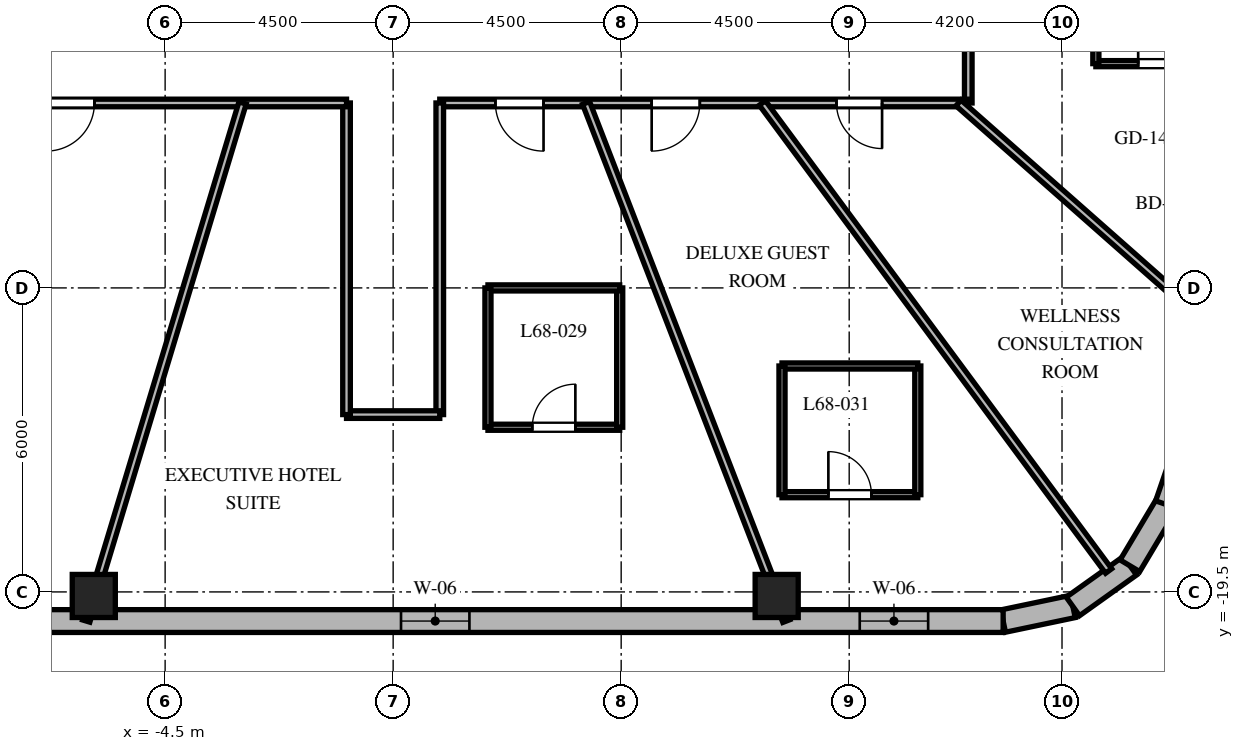
"""IFC4 building model, lengths in metres.
Left out: names, types, materials, properties, quantities, classifications, styles, units other than length and angle.
Written with IfcOpenShell. Run it as: python <this file> out.ifc"""

import sys

from ifc_helpers import new_model, si_unit, direction, frame, frame_2d, origin, origin_2d, place, context, subcontext, project, spatial, rectangle, extrude, element, fill, save


model = new_model("IFC4")
c1 = context("Model", 3, precision=1e-05, world=origin(), true_north=direction((0.0, 1.0)))
c2 = subcontext(c1, "Body", "Model", "MODEL_VIEW")
j1 = project(units=[si_unit("LENGTHUNIT", "METRE"), si_unit("PLANEANGLEUNIT", "RADIAN")], contexts=[c1])
p1 = place(None, origin())
s1 = spatial("IfcSite", under=j1, at=p1, CompositionType="ELEMENT")
p2 = place(p1, origin())
s2 = spatial("IfcBuilding", under=s1, at=p2, CompositionType="ELEMENT")
p3 = place(p2, frame((0.0, 0.0, 273.0)))
s3 = spatial("IfcBuildingStorey", under=s2, at=p3, CompositionType="ELEMENT", Elevation=273.0)
for number, where, z_axis, x_axis in (
    (1, (-5.908, -19.58, 0.0), (0.0, 0.0, 1.0), (1.0, 0.0, 0.0)),
    (2, (7.569, -19.58, 0.0), (0.0, 0.0, 1.0), (1.0, 0.0, 0.0)),
):
    element("IfcColumn", number, at=place(p3, frame(where, z_axis=z_axis, x_axis=x_axis)), inside=s3, PredefinedType="COLUMN", context=c2, shape_type="SweptSolid", body=[
        extrude(rectangle(XDim=0.85, YDim=0.85, at=origin_2d()), origin(), (0.0, 0.0, 1.0), 3.9),
    ])
p4 = place(p3, frame((12.038, -20.075, 0.0), z_axis=(0.0, 0.0, 1.0), x_axis=(0.978750122553, 0.205056571711, 0.0)))
e3 = element("IfcWall", 3, at=p4, inside=s3, PredefinedType="SOLIDWALL", context=c2, shape_type="SweptSolid", body=[
    extrude(rectangle(XDim=1.406, YDim=0.45, at=frame_2d((0.703, 0.0))), origin(), (0.0, 0.0, 1.0), 3.6),
])
p5 = place(p3, frame((13.415, -19.787, 0.0), z_axis=(0.0, 0.0, 1.0), x_axis=(0.814055493997, 0.580787097561, 0.0)))
e4 = element("IfcWall", 4, at=p5, inside=s3, PredefinedType="SOLIDWALL", context=c2, shape_type="SweptSolid", body=[
    extrude(rectangle(XDim=1.383, YDim=0.45, at=frame_2d((0.691, 0.0))), origin(), (0.0, 0.0, 1.0), 3.6),
])
p6 = place(p3, frame((14.54, -18.984, 0.0), z_axis=(0.0, 0.0, 1.0), x_axis=(0.512374906623, 0.858761873317, 0.0)))
e5 = element("IfcWall", 5, at=p6, inside=s3, PredefinedType="SOLIDWALL", context=c2, shape_type="SweptSolid", body=[
    extrude(rectangle(XDim=1.406, YDim=0.45, at=frame_2d((0.703, 0.0))), origin(), (0.0, 0.0, 1.0), 3.6),
])
p7 = place(p3, frame((-10.379, -20.075, 0.0), z_axis=(0.0, 0.0, 1.0), x_axis=(1.0, 0.0, 0.0)))
e6 = element("IfcWall", 6, at=p7, inside=s3, PredefinedType="SOLIDWALL", context=c2, shape_type="SweptSolid", body=[
    extrude(rectangle(XDim=22.417, YDim=0.45, at=frame_2d((11.208, 0.0))), origin(), (0.0, 0.0, 1.0), 3.6),
])
p8 = place(p7, frame((1.48, 0.0, 0.8)))
e7 = element("IfcOpeningElement", 7, at=p8, cuts=e6, PredefinedType="OPENING", context=c2, shape_type="SweptSolid", body=[
    extrude(rectangle(XDim=1.35, YDim=1.75, at=frame_2d((0.675, 0.875))), frame((0.0, 0.235, 0.0), z_axis=(0.0, -1.0, 0.0), x_axis=(1.0, 0.0, 0.0)), (0.0, 0.0, 1.0), 0.47),
])
p9 = place(p7, frame((10.534, 0.0, 0.8)))
e8 = element("IfcOpeningElement", 8, at=p9, cuts=e6, PredefinedType="OPENING", context=c2, shape_type="SweptSolid", body=[
    extrude(rectangle(XDim=1.35, YDim=1.75, at=frame_2d((0.675, 0.875))), frame((0.0, 0.235, 0.0), z_axis=(0.0, -1.0, 0.0), x_axis=(1.0, 0.0, 0.0)), (0.0, 0.0, 1.0), 0.47),
])
p10 = place(p7, frame((19.587, 0.0, 0.8)))
e9 = element("IfcOpeningElement", 9, at=p10, cuts=e6, PredefinedType="OPENING", context=c2, shape_type="SweptSolid", body=[
    extrude(rectangle(XDim=1.35, YDim=1.75, at=frame_2d((0.675, 0.875))), frame((0.0, 0.235, 0.0), z_axis=(0.0, -1.0, 0.0), x_axis=(1.0, 0.0, 0.0)), (0.0, 0.0, 1.0), 0.47),
])
p11 = place(p3, frame((15.26, -17.776, 0.0), z_axis=(0.0, 0.0, 1.0), x_axis=(0.325407437101, 0.945573899745, 0.0)))
e10 = element("IfcWall", 10, at=p11, inside=s3, PredefinedType="SOLIDWALL", context=c2, shape_type="SweptSolid", body=[
    extrude(rectangle(XDim=18.552, YDim=0.45, at=frame_2d((9.276, 0.0))), origin(), (0.0, 0.0, 1.0), 3.6),
])
p12 = place(p11, frame((4.602, 0.0, 0.0)))
e11 = element("IfcOpeningElement", 11, at=p12, cuts=e10, PredefinedType="OPENING", context=c2, shape_type="SweptSolid", body=[
    extrude(rectangle(XDim=0.95, YDim=2.15, at=frame_2d((0.475, 1.075))), frame((0.0, 0.235, 0.0), z_axis=(0.0, -1.0, 0.0), x_axis=(1.0, 0.0, 0.0)), (0.0, 0.0, 1.0), 0.47),
])
p13 = place(p11, frame((1.161, 0.0, 0.8)))
e12 = element("IfcOpeningElement", 12, at=p13, cuts=e10, PredefinedType="OPENING", context=c2, shape_type="SweptSolid", body=[
    extrude(rectangle(XDim=1.35, YDim=1.75, at=frame_2d((0.675, 0.875))), frame((0.0, 0.235, 0.0), z_axis=(0.0, -1.0, 0.0), x_axis=(1.0, 0.0, 0.0)), (0.0, 0.0, 1.0), 0.47),
])
p14 = place(p11, frame((8.548, 0.0, 0.8)))
e13 = element("IfcOpeningElement", 13, at=p14, cuts=e10, PredefinedType="OPENING", context=c2, shape_type="SweptSolid", body=[
    extrude(rectangle(XDim=1.35, YDim=1.75, at=frame_2d((0.675, 0.875))), frame((0.0, 0.235, 0.0), z_axis=(0.0, -1.0, 0.0), x_axis=(1.0, 0.0, 0.0)), (0.0, 0.0, 1.0), 0.47),
])
p15 = place(p11, frame((15.987, 0.0, 0.8)))
e14 = element("IfcOpeningElement", 14, at=p15, cuts=e10, PredefinedType="OPENING", context=c2, shape_type="SweptSolid", body=[
    extrude(rectangle(XDim=1.35, YDim=1.75, at=frame_2d((0.675, 0.875))), frame((0.0, 0.235, 0.0), z_axis=(0.0, -1.0, 0.0), x_axis=(1.0, 0.0, 0.0)), (0.0, 0.0, 1.0), 0.47),
])
p16 = place(p3, frame((11.35, -4.4, 0.0), z_axis=(0.0, 0.0, 1.0), x_axis=(0.0, -1.0, 0.0)))
e15 = element("IfcWall", 15, at=p16, inside=s3, PredefinedType="PARTITIONING", context=c2, shape_type="SweptSolid", body=[
    extrude(rectangle(XDim=5.45, YDim=0.15, at=frame_2d((2.725, 0.0))), origin(), (0.0, 0.0, 1.0), 3.09),
])
p17 = place(p3, frame((11.35, -9.85, 0.0), z_axis=(0.0, 0.0, 1.0), x_axis=(-1.0, 0.0, 0.0)))
e16 = element("IfcWall", 16, at=p17, inside=s3, PredefinedType="PARTITIONING", context=c2, shape_type="SweptSolid", body=[
    extrude(rectangle(XDim=10.43, YDim=0.15, at=frame_2d((5.215, 0.0))), origin(), (0.0, 0.0, 1.0), 3.09),
])
p18 = place(p17, frame((8.382, 0.0, 0.0)))
e17 = element("IfcOpeningElement", 17, at=p18, cuts=e16, PredefinedType="OPENING", context=c2, shape_type="SweptSolid", body=[
    extrude(rectangle(XDim=0.95, YDim=2.03, at=frame_2d((0.475, 1.015))), frame((0.0, 0.085, 0.0), z_axis=(0.0, -1.0, 0.0), x_axis=(1.0, 0.0, 0.0)), (0.0, 0.0, 1.0), 0.17),
])
p19 = place(p17, frame((5.298, 0.0, 0.0)))
e18 = element("IfcOpeningElement", 18, at=p19, cuts=e16, PredefinedType="OPENING", context=c2, shape_type="SweptSolid", body=[
    extrude(rectangle(XDim=0.95, YDim=2.03, at=frame_2d((0.475, 1.015))), frame((0.0, 0.085, 0.0), z_axis=(0.0, -1.0, 0.0), x_axis=(1.0, 0.0, 0.0)), (0.0, 0.0, 1.0), 0.17),
])
p20 = place(p17, frame((1.701, 0.0, 0.0)))
e19 = element("IfcOpeningElement", 19, at=p20, cuts=e16, PredefinedType="OPENING", context=c2, shape_type="SweptSolid", body=[
    extrude(rectangle(XDim=0.9, YDim=2.03, at=frame_2d((0.45, 1.015))), frame((0.0, 0.085, 0.0), z_axis=(0.0, -1.0, 0.0), x_axis=(1.0, 0.0, 0.0)), (0.0, 0.0, 1.0), 0.17),
])
p21 = place(p3, frame((0.92, -9.85, 0.0), z_axis=(0.0, 0.0, 1.0), x_axis=(0.0, -1.0, 0.0)))
e20 = element("IfcWall", 20, at=p21, inside=s3, PredefinedType="PARTITIONING", context=c2, shape_type="SweptSolid", body=[
    extrude(rectangle(XDim=6.15, YDim=0.15, at=frame_2d((3.075, 0.0))), origin(), (0.0, 0.0, 1.0), 3.041),
])
p22 = place(p3, frame((0.92, -16.0, 0.0), z_axis=(0.0, 0.0, 1.0), x_axis=(-1.0, 0.0, 0.0)))
e21 = element("IfcWall", 21, at=p22, inside=s3, PredefinedType="PARTITIONING", context=c2, shape_type="SweptSolid", body=[
    extrude(rectangle(XDim=1.84, YDim=0.15, at=frame_2d((0.92, 0.0))), origin(), (0.0, 0.0, 1.0), 3.6),
])
p23 = place(p3, frame((-0.92, -16.0, 0.0), z_axis=(0.0, 0.0, 1.0), x_axis=(0.0, 1.0, 0.0)))
e22 = element("IfcWall", 22, at=p23, inside=s3, PredefinedType="PARTITIONING", context=c2, shape_type="SweptSolid", body=[
    extrude(rectangle(XDim=6.15, YDim=0.15, at=frame_2d((3.075, 0.0))), origin(), (0.0, 0.0, 1.0), 3.041),
])
p24 = place(p3, frame((-0.92, -9.85, 0.0), z_axis=(0.0, 0.0, 1.0), x_axis=(-1.0, 0.0, 0.0)))
e23 = element("IfcWall", 23, at=p24, inside=s3, PredefinedType="PARTITIONING", context=c2, shape_type="SweptSolid", body=[
    extrude(rectangle(XDim=10.43, YDim=0.15, at=frame_2d((5.215, 0.0))), origin(), (0.0, 0.0, 1.0), 3.09),
])
p25 = place(p24, frame((4.975, 0.0, 0.0)))
e24 = element("IfcOpeningElement", 24, at=p25, cuts=e23, PredefinedType="OPENING", context=c2, shape_type="SweptSolid", body=[
    extrude(rectangle(XDim=0.95, YDim=2.03, at=frame_2d((0.475, 1.015))), frame((0.0, 0.085, 0.0), z_axis=(0.0, -1.0, 0.0), x_axis=(1.0, 0.0, 0.0)), (0.0, 0.0, 1.0), 0.17),
])
p26 = place(p3, frame((-2.972, -9.85, 0.0), z_axis=(0.0, 0.0, 1.0), x_axis=(-0.288872169679, -0.957367677324, 0.0)))
e25 = element("IfcWall", 25, at=p26, inside=s3, PredefinedType="PARTITIONING", context=c2, shape_type="SweptSolid", body=[
    extrude(rectangle(XDim=10.68, YDim=0.15, at=frame_2d((5.34, 0.0))), origin(), (0.0, 0.0, 1.0), 2.94),
])
p27 = place(p3, frame((3.808, -9.85, 0.0), z_axis=(0.0, 0.0, 1.0), x_axis=(0.360587327934, -0.932725457427, 0.0)))
e26 = element("IfcWall", 26, at=p27, inside=s3, PredefinedType="PARTITIONING", context=c2, shape_type="SweptSolid", body=[
    extrude(rectangle(XDim=10.962, YDim=0.15, at=frame_2d((5.481, 0.0))), origin(), (0.0, 0.0, 1.0), 2.94),
])
p28 = place(p3, frame((7.287, -9.85, 0.0), z_axis=(0.0, 0.0, 1.0), x_axis=(0.594730961824, -0.803924799373, 0.0)))
e27 = element("IfcWall", 27, at=p28, inside=s3, PredefinedType="PARTITIONING", context=c2, shape_type="SweptSolid", body=[
    extrude(rectangle(XDim=11.49, YDim=0.15, at=frame_2d((5.745, 0.0))), origin(), (0.0, 0.0, 1.0), 2.94),
])
p29 = place(p3, frame((11.157, -9.85, 0.0), z_axis=(0.0, 0.0, 1.0), x_axis=(0.74966962095, -0.661812253909, 0.0)))
e28 = element("IfcWall", 28, at=p29, inside=s3, PredefinedType="PARTITIONING", context=c2, shape_type="SweptSolid", body=[
    extrude(rectangle(XDim=6.989, YDim=0.15, at=frame_2d((3.494, 0.0))), origin(), (0.0, 0.0, 1.0), 2.94),
])
p30 = place(p3, frame((1.871, -16.25, 0.0), z_axis=(0.0, 0.0, 1.0), x_axis=(1.0, 0.0, 0.0)))
e29 = element("IfcWall", 29, at=p30, inside=s3, PredefinedType="PARTITIONING", context=c2, shape_type="SweptSolid", body=[
    extrude(rectangle(XDim=2.6, YDim=0.12, at=frame_2d((1.3, 0.0))), origin(), (0.0, 0.0, 1.0), 3.6),
])
p31 = place(p30, frame((0.875, 0.0, 0.0)))
e30 = element("IfcOpeningElement", 30, at=p31, cuts=e29, PredefinedType="OPENING", context=c2, shape_type="SweptSolid", body=[
    extrude(rectangle(XDim=0.85, YDim=2.03, at=frame_2d((0.425, 1.015))), frame((0.0, 0.07, 0.0), z_axis=(0.0, -1.0, 0.0), x_axis=(1.0, 0.0, 0.0)), (0.0, 0.0, 1.0), 0.14),
])
p32 = place(p3, frame((4.471, -16.25, 0.0), z_axis=(0.0, 0.0, 1.0), x_axis=(0.0, 1.0, 0.0)))
e31 = element("IfcWall", 31, at=p32, inside=s3, PredefinedType="PARTITIONING", context=c2, shape_type="SweptSolid", body=[
    extrude(rectangle(XDim=2.75, YDim=0.12, at=frame_2d((1.375, 0.0))), origin(), (0.0, 0.0, 1.0), 3.041),
])
p33 = place(p3, frame((4.471, -13.5, 0.0), z_axis=(0.0, 0.0, 1.0), x_axis=(-1.0, 0.0, 0.0)))
e32 = element("IfcWall", 32, at=p33, inside=s3, PredefinedType="PARTITIONING", context=c2, shape_type="SweptSolid", body=[
    extrude(rectangle(XDim=2.6, YDim=0.12, at=frame_2d((1.3, 0.0))), origin(), (0.0, 0.0, 1.0), 3.6),
])
p34 = place(p3, frame((1.871, -13.5, 0.0), z_axis=(0.0, 0.0, 1.0), x_axis=(0.0, -1.0, 0.0)))
e33 = element("IfcWall", 33, at=p34, inside=s3, PredefinedType="PARTITIONING", context=c2, shape_type="SweptSolid", body=[
    extrude(rectangle(XDim=2.75, YDim=0.12, at=frame_2d((1.375, 0.0))), origin(), (0.0, 0.0, 1.0), 3.041),
])
p35 = place(p3, frame((7.674, -17.581, 0.0), z_axis=(0.0, 0.0, 1.0), x_axis=(1.0, 0.0, 0.0)))
e34 = element("IfcWall", 34, at=p35, inside=s3, PredefinedType="PARTITIONING", context=c2, shape_type="SweptSolid", body=[
    extrude(rectangle(XDim=2.68, YDim=0.12, at=frame_2d((1.34, 0.0))), origin(), (0.0, 0.0, 1.0), 2.94),
])
p36 = place(p35, frame((0.915, 0.0, 0.0)))
e35 = element("IfcOpeningElement", 35, at=p36, cuts=e34, PredefinedType="OPENING", context=c2, shape_type="SweptSolid", body=[
    extrude(rectangle(XDim=0.85, YDim=2.03, at=frame_2d((0.425, 1.015))), frame((0.0, 0.07, 0.0), z_axis=(0.0, -1.0, 0.0), x_axis=(1.0, 0.0, 0.0)), (0.0, 0.0, 1.0), 0.14),
])
p37 = place(p3, frame((10.354, -17.581, 0.0), z_axis=(0.0, 0.0, 1.0), x_axis=(0.0, 1.0, 0.0)))
e36 = element("IfcWall", 36, at=p37, inside=s3, PredefinedType="PARTITIONING", context=c2, shape_type="SweptSolid", body=[
    extrude(rectangle(XDim=2.54, YDim=0.12, at=frame_2d((1.27, 0.0))), origin(), (0.0, 0.0, 1.0), 2.94),
])
p38 = place(p3, frame((10.354, -15.041, 0.0), z_axis=(0.0, 0.0, 1.0), x_axis=(-1.0, 0.0, 0.0)))
e37 = element("IfcWall", 37, at=p38, inside=s3, PredefinedType="PARTITIONING", context=c2, shape_type="SweptSolid", body=[
    extrude(rectangle(XDim=2.68, YDim=0.12, at=frame_2d((1.34, 0.0))), origin(), (0.0, 0.0, 1.0), 3.09),
])
p39 = place(p3, frame((7.674, -15.041, 0.0), z_axis=(0.0, 0.0, 1.0), x_axis=(0.0, -1.0, 0.0)))
e38 = element("IfcWall", 38, at=p39, inside=s3, PredefinedType="PARTITIONING", context=c2, shape_type="SweptSolid", body=[
    extrude(rectangle(XDim=2.54, YDim=0.12, at=frame_2d((1.27, 0.0))), origin(), (0.0, 0.0, 1.0), 3.041),
])
p40 = place(p3, frame((13.868, -9.074, 0.0), z_axis=(0.0, 0.0, 1.0), x_axis=(1.0, 0.0, 0.0)))
e39 = element("IfcWall", 39, at=p40, inside=s3, PredefinedType="PARTITIONING", context=c2, shape_type="SweptSolid", body=[
    extrude(rectangle(XDim=2.52, YDim=0.12, at=frame_2d((1.26, 0.0))), origin(), (0.0, 0.0, 1.0), 3.172),
])
p41 = place(p40, frame((0.835, 0.0, 0.0)))
e40 = element("IfcOpeningElement", 40, at=p41, cuts=e39, PredefinedType="OPENING", context=c2, shape_type="SweptSolid", body=[
    extrude(rectangle(XDim=0.85, YDim=2.03, at=frame_2d((0.425, 1.015))), frame((0.0, 0.07, 0.0), z_axis=(0.0, -1.0, 0.0), x_axis=(1.0, 0.0, 0.0)), (0.0, 0.0, 1.0), 0.14),
])
p42 = place(p3, frame((13.868, -6.394, 0.0), z_axis=(0.0, 0.0, 1.0), x_axis=(0.0, -1.0, 0.0)))
e41 = element("IfcWall", 41, at=p42, inside=s3, PredefinedType="PARTITIONING", context=c2, shape_type="SweptSolid", body=[
    extrude(rectangle(XDim=2.68, YDim=0.12, at=frame_2d((1.34, 0.0))), origin(), (0.0, 0.0, 1.0), 3.6),
])
p43 = place(p9, origin())
e42 = element("IfcWindow", 42, at=p43, inside=s3, PartitioningType="SINGLE_PANEL", PredefinedType="WINDOW", context=c2, shape_type="SweptSolid", body=[
    extrude(rectangle(XDim=1.35, YDim=1.75, at=frame_2d((0.675, 0.875))), frame((0.0, 0.03, 0.0), z_axis=(0.0, -1.0, 0.0), x_axis=(1.0, 0.0, 0.0)), (0.0, 0.0, 1.0), 0.06),
])
fill(e8, e42)
p44 = place(p10, origin())
e43 = element("IfcWindow", 43, at=p44, inside=s3, PartitioningType="SINGLE_PANEL", PredefinedType="WINDOW", context=c2, shape_type="SweptSolid", body=[
    extrude(rectangle(XDim=1.35, YDim=1.75, at=frame_2d((0.675, 0.875))), frame((0.0, 0.03, 0.0), z_axis=(0.0, -1.0, 0.0), x_axis=(1.0, 0.0, 0.0)), (0.0, 0.0, 1.0), 0.06),
])
fill(e9, e43)
p45 = place(p25, origin())
e44 = element("IfcDoor", 44, at=p45, inside=s3, OperationType="SINGLE_SWING_RIGHT", PredefinedType="DOOR", context=c2, shape_type="SweptSolid", body=[
    extrude(rectangle(XDim=0.95, YDim=2.03, at=frame_2d((0.475, 1.015))), frame((0.0, 0.025, 0.0), z_axis=(0.0, -1.0, 0.0), x_axis=(1.0, 0.0, 0.0)), (0.0, 0.0, 1.0), 0.05),
])
fill(e24, e44)
p46 = place(p18, origin())
e45 = element("IfcDoor", 45, at=p46, inside=s3, OperationType="SINGLE_SWING_LEFT", PredefinedType="DOOR", context=c2, shape_type="SweptSolid", body=[
    extrude(rectangle(XDim=0.95, YDim=2.03, at=frame_2d((0.475, 1.015))), frame((0.0, 0.025, 0.0), z_axis=(0.0, -1.0, 0.0), x_axis=(1.0, 0.0, 0.0)), (0.0, 0.0, 1.0), 0.05),
])
fill(e17, e45)
p47 = place(p31, origin())
e46 = element("IfcDoor", 46, at=p47, inside=s3, OperationType="SINGLE_SWING_RIGHT", PredefinedType="DOOR", context=c2, shape_type="SweptSolid", body=[
    extrude(rectangle(XDim=0.85, YDim=2.03, at=frame_2d((0.425, 1.015))), frame((0.0, 0.025, 0.0), z_axis=(0.0, -1.0, 0.0), x_axis=(1.0, 0.0, 0.0)), (0.0, 0.0, 1.0), 0.05),
])
fill(e30, e46)
p48 = place(p19, origin())
e47 = element("IfcDoor", 47, at=p48, inside=s3, OperationType="SINGLE_SWING_RIGHT", PredefinedType="DOOR", context=c2, shape_type="SweptSolid", body=[
    extrude(rectangle(XDim=0.95, YDim=2.03, at=frame_2d((0.475, 1.015))), frame((0.0, 0.025, 0.0), z_axis=(0.0, -1.0, 0.0), x_axis=(1.0, 0.0, 0.0)), (0.0, 0.0, 1.0), 0.05),
])
fill(e18, e47)
p49 = place(p36, origin())
e48 = element("IfcDoor", 48, at=p49, inside=s3, OperationType="SINGLE_SWING_LEFT", PredefinedType="DOOR", context=c2, shape_type="SweptSolid", body=[
    extrude(rectangle(XDim=0.85, YDim=2.03, at=frame_2d((0.425, 1.015))), frame((0.0, 0.025, 0.0), z_axis=(0.0, -1.0, 0.0), x_axis=(1.0, 0.0, 0.0)), (0.0, 0.0, 1.0), 0.05),
])
fill(e35, e48)
p50 = place(p20, origin())
e49 = element("IfcDoor", 49, at=p50, inside=s3, OperationType="SINGLE_SWING_LEFT", PredefinedType="DOOR", context=c2, shape_type="SweptSolid", body=[
    extrude(rectangle(XDim=0.9, YDim=2.03, at=frame_2d((0.45, 1.015))), frame((0.0, 0.025, 0.0), z_axis=(0.0, -1.0, 0.0), x_axis=(1.0, 0.0, 0.0)), (0.0, 0.0, 1.0), 0.05),
])
fill(e19, e49)
p51 = place(p41, origin())
e50 = element("IfcDoor", 50, at=p51, inside=s3, OperationType="SINGLE_SWING_LEFT", PredefinedType="DOOR", context=c2, shape_type="SweptSolid", body=[
    extrude(rectangle(XDim=0.85, YDim=2.03, at=frame_2d((0.425, 1.015))), frame((0.0, 0.025, 0.0), z_axis=(0.0, -1.0, 0.0), x_axis=(1.0, 0.0, 0.0)), (0.0, 0.0, 1.0), 0.05),
])
fill(e40, e50)
save(model, sys.argv[1])
